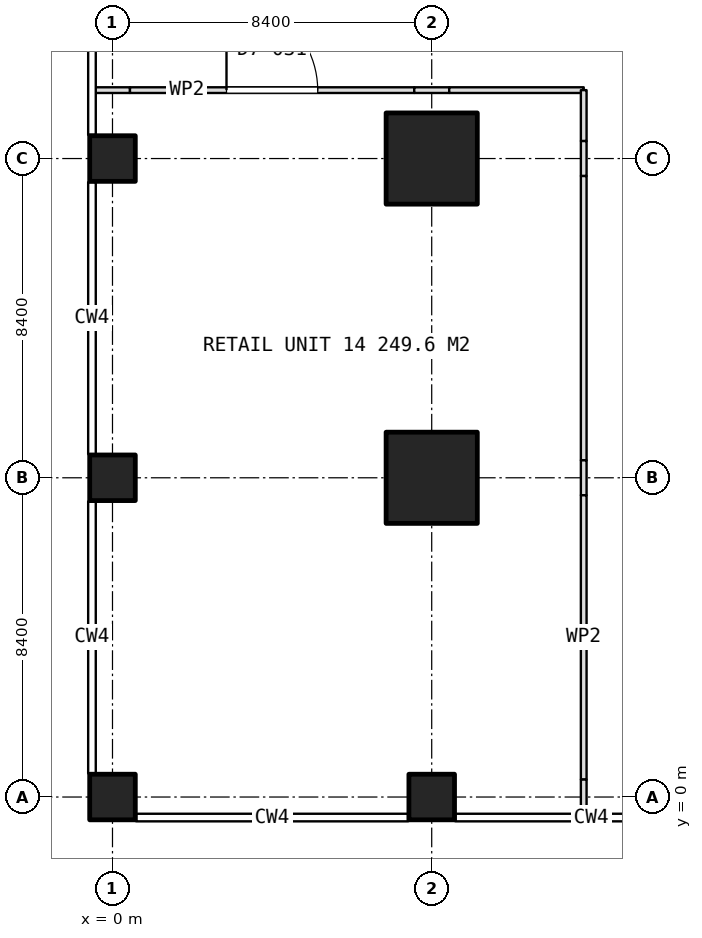
"""IFC4 building model, lengths in metres.
Left out: names, types, materials, properties, quantities, classifications, styles, units other than length and angle.
Written with IfcOpenShell. Run it as: python <this file> out.ifc"""

import sys

from ifc_helpers import new_model, si_unit, direction, frame, frame_2d, origin, origin_2d, place, context, subcontext, project, spatial, rectangle, extrude, element, fill, save


model = new_model("IFC4")
c1 = context("Model", 3, precision=1e-05, world=origin(), true_north=direction((0.0, 1.0)))
c2 = subcontext(c1, "Body", "Model", "MODEL_VIEW")
j1 = project(units=[si_unit("LENGTHUNIT", "METRE"), si_unit("PLANEANGLEUNIT", "RADIAN")], contexts=[c1])
p1 = place(None, origin())
s1 = spatial("IfcSite", under=j1, at=p1, CompositionType="ELEMENT")
p2 = place(p1, origin())
s2 = spatial("IfcBuilding", under=s1, at=p2, CompositionType="ELEMENT")
p3 = place(p2, frame((0.0, 0.0, 15.4)))
s3 = spatial("IfcBuildingStorey", under=s2, at=p3, CompositionType="ELEMENT", Elevation=15.4)
for number, where, z_axis, x_axis in (
    (1, (0.0, 0.0, 0.0), (0.0, 0.0, 1.0), (1.0, 0.0, 0.0)),
    (2, (0.0, 8.4, 0.0), (0.0, 0.0, 1.0), (1.0, 0.0, 0.0)),
    (3, (0.0, 16.8, 0.0), (0.0, 0.0, 1.0), (1.0, 0.0, 0.0)),
    (4, (8.4, 0.0, 0.0), (0.0, 0.0, 1.0), (1.0, 0.0, 0.0)),
):
    element("IfcColumn", number, at=place(p3, frame(where, z_axis=z_axis, x_axis=x_axis)), inside=s3, PredefinedType="COLUMN", context=c2, shape_type="SweptSolid", body=[
        extrude(rectangle(XDim=1.2, YDim=1.2, at=origin_2d()), origin(), (0.0, 0.0, 1.0), 5.0),
    ])
for number, where, z_axis, x_axis in (
    (5, (8.4, 8.4, 0.0), (0.0, 0.0, 1.0), (1.0, 0.0, 0.0)),
    (6, (8.4, 16.8, 0.0), (0.0, 0.0, 1.0), (1.0, 0.0, 0.0)),
):
    element("IfcColumn", number, at=place(p3, frame(where, z_axis=z_axis, x_axis=x_axis)), inside=s3, PredefinedType="COLUMN", context=c2, shape_type="SweptSolid", body=[
        extrude(rectangle(XDim=2.4, YDim=2.4, at=origin_2d()), origin(), (0.0, 0.0, 1.0), 5.0),
    ])
p4 = place(p3, frame((-0.49, 18.6, 0.0), z_axis=(0.0, 0.0, 1.0), x_axis=(1.0, 0.0, 0.0)))
e7 = element("IfcWall", 7, at=p4, inside=s3, PredefinedType="PARTITIONING", context=c2, shape_type="SweptSolid", body=[
    extrude(rectangle(XDim=0.95, YDim=0.15, at=frame_2d((0.475, 0.0))), origin(), (0.0, 0.0, 1.0), 2.9),
])
p5 = place(p3, frame((0.46, 18.6, 0.0), z_axis=(0.0, 0.0, 1.0), x_axis=(1.0, 0.0, 0.0)))
e8 = element("IfcWall", 8, at=p5, inside=s3, PredefinedType="PARTITIONING", context=c2, shape_type="SweptSolid", body=[
    extrude(rectangle(XDim=7.48, YDim=0.15, at=frame_2d((3.74, 0.0))), origin(), (0.0, 0.0, 1.0), 4.7),
])
p6 = place(p5, frame((2.54, 0.0, 0.0)))
e9 = element("IfcOpeningElement", 9, at=p6, cuts=e8, PredefinedType="OPENING", context=c2, shape_type="SweptSolid", body=[
    extrude(rectangle(XDim=2.4, YDim=2.4, at=frame_2d((1.2, 1.2))), frame((0.0, 0.085, 0.0), z_axis=(0.0, -1.0, 0.0), x_axis=(1.0, 0.0, 0.0)), (0.0, 0.0, 1.0), 0.17),
])
p7 = place(p3, frame((7.94, 18.6, 0.0), z_axis=(0.0, 0.0, 1.0), x_axis=(1.0, 0.0, 0.0)))
e10 = element("IfcWall", 10, at=p7, inside=s3, PredefinedType="PARTITIONING", context=c2, shape_type="SweptSolid", body=[
    extrude(rectangle(XDim=0.92, YDim=0.15, at=frame_2d((0.46, 0.0))), origin(), (0.0, 0.0, 1.0), 2.9),
])
p8 = place(p3, frame((8.86, 18.6, 0.0), z_axis=(0.0, 0.0, 1.0), x_axis=(1.0, 0.0, 0.0)))
e11 = element("IfcWall", 11, at=p8, inside=s3, PredefinedType="PARTITIONING", context=c2, shape_type="SweptSolid", body=[
    extrude(rectangle(XDim=3.54, YDim=0.15, at=frame_2d((1.77, 0.0))), origin(), (0.0, 0.0, 1.0), 4.7),
])
p9 = place(p3, frame((12.4, 18.6, 0.0), z_axis=(0.0, 0.0, 1.0), x_axis=(0.0, -1.0, 0.0)))
e12 = element("IfcWall", 12, at=p9, inside=s3, PredefinedType="PARTITIONING", context=c2, shape_type="SweptSolid", body=[
    extrude(rectangle(XDim=1.34, YDim=0.15, at=frame_2d((0.67, 0.0))), origin(), (0.0, 0.0, 1.0), 4.7),
])
p10 = place(p3, frame((12.4, 17.26, 0.0), z_axis=(0.0, 0.0, 1.0), x_axis=(0.0, -1.0, 0.0)))
e13 = element("IfcWall", 13, at=p10, inside=s3, PredefinedType="PARTITIONING", context=c2, shape_type="SweptSolid", body=[
    extrude(rectangle(XDim=0.92, YDim=0.15, at=frame_2d((0.46, 0.0))), origin(), (0.0, 0.0, 1.0), 2.9),
])
p11 = place(p3, frame((12.4, 16.34, 0.0), z_axis=(0.0, 0.0, 1.0), x_axis=(0.0, -1.0, 0.0)))
e14 = element("IfcWall", 14, at=p11, inside=s3, PredefinedType="PARTITIONING", context=c2, shape_type="SweptSolid", body=[
    extrude(rectangle(XDim=7.48, YDim=0.15, at=frame_2d((3.74, 0.0))), origin(), (0.0, 0.0, 1.0), 4.7),
])
p12 = place(p3, frame((12.4, 8.86, 0.0), z_axis=(0.0, 0.0, 1.0), x_axis=(0.0, -1.0, 0.0)))
e15 = element("IfcWall", 15, at=p12, inside=s3, PredefinedType="PARTITIONING", context=c2, shape_type="SweptSolid", body=[
    extrude(rectangle(XDim=0.92, YDim=0.15, at=frame_2d((0.46, 0.0))), origin(), (0.0, 0.0, 1.0), 2.9),
])
p13 = place(p3, frame((12.4, 7.94, 0.0), z_axis=(0.0, 0.0, 1.0), x_axis=(0.0, -1.0, 0.0)))
e16 = element("IfcWall", 16, at=p13, inside=s3, PredefinedType="PARTITIONING", context=c2, shape_type="SweptSolid", body=[
    extrude(rectangle(XDim=7.48, YDim=0.15, at=frame_2d((3.74, 0.0))), origin(), (0.0, 0.0, 1.0), 4.7),
])
p14 = place(p3, frame((12.4, 0.46, 0.0), z_axis=(0.0, 0.0, 1.0), x_axis=(0.0, -1.0, 0.0)))
e17 = element("IfcWall", 17, at=p14, inside=s3, PredefinedType="PARTITIONING", context=c2, shape_type="SweptSolid", body=[
    extrude(rectangle(XDim=0.95, YDim=0.15, at=frame_2d((0.475, 0.0))), origin(), (0.0, 0.0, 1.0), 2.9),
])
p15 = place(p6, origin())
e18 = element("IfcDoor", 18, at=p15, inside=s3, OperationType="DOUBLE_DOOR_SINGLE_SWING", PredefinedType="DOOR", context=c2, shape_type="SweptSolid", body=[
    extrude(rectangle(XDim=2.4, YDim=2.4, at=frame_2d((1.2, 1.2))), frame((0.0, 0.025, 0.0), z_axis=(0.0, -1.0, 0.0), x_axis=(1.0, 0.0, 0.0)), (0.0, 0.0, 1.0), 0.05),
])
fill(e9, e18)
save(model, sys.argv[1])
